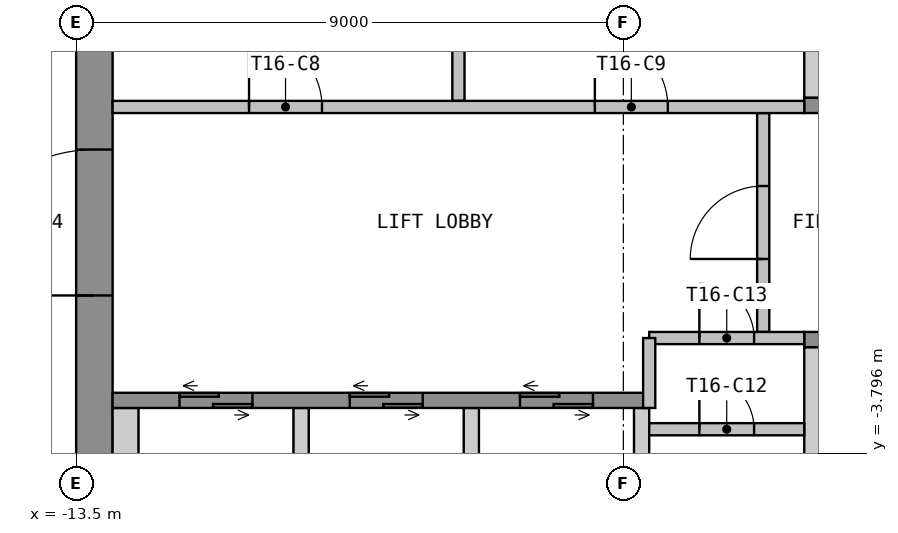
"""IFC4 building model, lengths in metres.
Left out: names, types, materials, properties, quantities, classifications, styles, units other than length and angle.
Written with IfcOpenShell. Run it as: python <this file> out.ifc"""

import sys

from ifc_helpers import new_model, si_unit, direction, frame, frame_2d, origin, place, context, subcontext, project, spatial, polyline, rectangle, outline, extrude, element, fill, save


model = new_model("IFC4")
c1 = context("Model", 3, precision=1e-05, world=origin(), true_north=direction((0.0, 1.0)))
c2 = subcontext(c1, "Body", "Model", "MODEL_VIEW")
j1 = project(units=[si_unit("LENGTHUNIT", "METRE"), si_unit("PLANEANGLEUNIT", "RADIAN")], contexts=[c1])
p1 = place(None, origin())
s1 = spatial("IfcSite", under=j1, at=p1, CompositionType="ELEMENT")
p2 = place(p1, origin())
s2 = spatial("IfcBuilding", under=s1, at=p2, CompositionType="ELEMENT")
p3 = place(p2, frame((0.0, 0.0, 219.0)))
s3 = spatial("IfcBuildingStorey", under=s2, at=p3, CompositionType="ELEMENT", Elevation=219.0)
p4 = place(p3, frame((-13.2, -10.65, 0.0), z_axis=(0.0, 0.0, 1.0), x_axis=(0.0, 1.0, 0.0)))
e1 = element("IfcWall", 1, at=p4, inside=s3, PredefinedType="SHEAR", context=c2, shape_type="SweptSolid", body=[
    extrude(rectangle(XDim=21.3, YDim=0.6, at=frame_2d((10.65, 0.0))), origin(), (0.0, 0.0, 1.0), 3.55),
])
p5 = place(p4, frame((9.45, 0.0, 0.0)))
e2 = element("IfcOpeningElement", 2, at=p5, cuts=e1, PredefinedType="OPENING", context=c2, shape_type="SweptSolid", body=[
    extrude(rectangle(XDim=2.4, YDim=2.1, at=frame_2d((1.2, 1.05))), frame((0.0, 0.31, 0.0), z_axis=(0.0, -1.0, 0.0), x_axis=(1.0, 0.0, 0.0)), (0.0, 0.0, 1.0), 0.62),
])
p6 = place(p3, origin())
e3 = element("IfcWall", 3, at=p6, inside=s3, PredefinedType="SHEAR", context=c2, shape_type="SweptSolid", body=[
    extrude(outline(polyline([(-1.525, 2.05), (-1.275, 2.05), (-1.275, 4.75), (-1.525, 4.75), (-1.525, 2.05)])), origin(), (0.0, 0.0, 1.0), 3.55),
])
p7 = place(p3, frame((-1.525, 1.925, 0.0), z_axis=(0.0, 0.0, 1.0), x_axis=(1.0, 0.0, 0.0)))
e4 = element("IfcWall", 4, at=p7, inside=s3, PredefinedType="SHEAR", context=c2, shape_type="SweptSolid", body=[
    extrude(rectangle(XDim=3.05, YDim=0.25, at=frame_2d((1.525, 0.0))), origin(), (0.0, 0.0, 1.0), 3.55),
])
p8 = place(p7, frame((0.925, 0.0, 0.0)))
e5 = element("IfcOpeningElement", 5, at=p8, cuts=e4, PredefinedType="OPENING", context=c2, shape_type="SweptSolid", body=[
    extrude(rectangle(XDim=1.2, YDim=2.1, at=frame_2d((0.6, 1.05))), frame((0.0, 0.135, 0.0), z_axis=(0.0, -1.0, 0.0), x_axis=(1.0, 0.0, 0.0)), (0.0, 0.0, 1.0), 0.27),
])
p9 = place(p3, origin())
e6 = element("IfcWall", 6, at=p9, inside=s3, PredefinedType="SHEAR", context=c2, shape_type="SweptSolid", body=[
    extrude(outline(polyline([(-12.9, -4.75), (-12.475, -4.75), (-12.475, -3.05), (-12.9, -3.05), (-12.9, -4.75)])), origin(), (0.0, 0.0, 1.0), 3.55),
])
p10 = place(p3, origin())
e7 = element("IfcWall", 7, at=p10, inside=s3, PredefinedType="SHEAR", context=c2, shape_type="SweptSolid", body=[
    extrude(outline(polyline([(-9.925, -4.75), (-9.675, -4.75), (-9.675, -3.05), (-9.925, -3.05), (-9.925, -4.75)])), origin(), (0.0, 0.0, 1.0), 3.55),
])
p11 = place(p3, origin())
e8 = element("IfcWall", 8, at=p11, inside=s3, PredefinedType="SHEAR", context=c2, shape_type="SweptSolid", body=[
    extrude(outline(polyline([(-7.125, -4.75), (-6.875, -4.75), (-6.875, -3.05), (-7.125, -3.05), (-7.125, -4.75)])), origin(), (0.0, 0.0, 1.0), 3.55),
])
p12 = place(p3, origin())
e9 = element("IfcWall", 9, at=p12, inside=s3, PredefinedType="SHEAR", context=c2, shape_type="SweptSolid", body=[
    extrude(outline(polyline([(-4.325, -4.75), (-4.075, -4.75), (-4.075, -3.05), (-4.325, -3.05), (-4.325, -4.75)])), origin(), (0.0, 0.0, 1.0), 3.55),
])
p13 = place(p3, origin())
e10 = element("IfcWall", 10, at=p13, inside=s3, PredefinedType="SHEAR", context=c2, shape_type="SweptSolid", body=[
    extrude(outline(polyline([(-1.525, -4.75), (-1.275, -4.75), (-1.275, -2.05), (-1.525, -2.05), (-1.525, -4.75)])), origin(), (0.0, 0.0, 1.0), 3.55),
])
p14 = place(p3, frame((-12.9, -2.925, 0.0), z_axis=(0.0, 0.0, 1.0), x_axis=(1.0, 0.0, 0.0)))
e11 = element("IfcWall", 11, at=p14, inside=s3, PredefinedType="SHEAR", context=c2, shape_type="SweptSolid", body=[
    extrude(rectangle(XDim=8.825, YDim=0.25, at=frame_2d((4.413, 0.0))), origin(), (0.0, 0.0, 1.0), 3.55),
])
p15 = place(p14, frame((1.1, 0.0, 0.0)))
e12 = element("IfcOpeningElement", 12, at=p15, cuts=e11, PredefinedType="OPENING", context=c2, shape_type="SweptSolid", body=[
    extrude(rectangle(XDim=1.2, YDim=2.1, at=frame_2d((0.6, 1.05))), frame((0.0, 0.135, 0.0), z_axis=(0.0, -1.0, 0.0), x_axis=(1.0, 0.0, 0.0)), (0.0, 0.0, 1.0), 0.27),
])
p16 = place(p14, frame((3.9, 0.0, 0.0)))
e13 = element("IfcOpeningElement", 13, at=p16, cuts=e11, PredefinedType="OPENING", context=c2, shape_type="SweptSolid", body=[
    extrude(rectangle(XDim=1.2, YDim=2.1, at=frame_2d((0.6, 1.05))), frame((0.0, 0.135, 0.0), z_axis=(0.0, -1.0, 0.0), x_axis=(1.0, 0.0, 0.0)), (0.0, 0.0, 1.0), 0.27),
])
p17 = place(p14, frame((6.7, 0.0, 0.0)))
e14 = element("IfcOpeningElement", 14, at=p17, cuts=e11, PredefinedType="OPENING", context=c2, shape_type="SweptSolid", body=[
    extrude(rectangle(XDim=1.2, YDim=2.1, at=frame_2d((0.6, 1.05))), frame((0.0, 0.135, 0.0), z_axis=(0.0, -1.0, 0.0), x_axis=(1.0, 0.0, 0.0)), (0.0, 0.0, 1.0), 0.27),
])
p18 = place(p3, frame((-1.525, -1.925, 0.0), z_axis=(0.0, 0.0, 1.0), x_axis=(1.0, 0.0, 0.0)))
e15 = element("IfcWall", 15, at=p18, inside=s3, PredefinedType="SHEAR", context=c2, shape_type="SweptSolid", body=[
    extrude(rectangle(XDim=14.425, YDim=0.25, at=frame_2d((7.212, 0.0))), origin(), (0.0, 0.0, 1.0), 3.55),
])
p19 = place(p18, frame((0.925, 0.0, 0.0)))
e16 = element("IfcOpeningElement", 16, at=p19, cuts=e15, PredefinedType="OPENING", context=c2, shape_type="SweptSolid", body=[
    extrude(rectangle(XDim=1.2, YDim=2.1, at=frame_2d((0.6, 1.05))), frame((0.0, 0.135, 0.0), z_axis=(0.0, -1.0, 0.0), x_axis=(1.0, 0.0, 0.0)), (0.0, 0.0, 1.0), 0.27),
])
p20 = place(p18, frame((3.725, 0.0, 0.0)))
e17 = element("IfcOpeningElement", 17, at=p20, cuts=e15, PredefinedType="OPENING", context=c2, shape_type="SweptSolid", body=[
    extrude(rectangle(XDim=1.2, YDim=2.1, at=frame_2d((0.6, 1.05))), frame((0.0, 0.135, 0.0), z_axis=(0.0, -1.0, 0.0), x_axis=(1.0, 0.0, 0.0)), (0.0, 0.0, 1.0), 0.27),
])
p21 = place(p3, frame((-2.2, -1.8, 0.0), z_axis=(0.0, 0.0, 1.0), x_axis=(0.0, 1.0, 0.0)))
e18 = element("IfcWall", 18, at=p21, inside=s3, PredefinedType="PARTITIONING", context=c2, shape_type="SweptSolid", body=[
    extrude(rectangle(XDim=3.6, YDim=0.2, at=frame_2d((1.8, 0.0))), origin(), (0.0, 0.0, 1.0), 3.55),
])
p22 = place(p21, frame((1.2, 0.0, 0.0)))
e19 = element("IfcOpeningElement", 19, at=p22, cuts=e18, PredefinedType="OPENING", context=c2, shape_type="SweptSolid", body=[
    extrude(rectangle(XDim=1.2, YDim=2.1, at=frame_2d((0.6, 1.05))), frame((0.0, 0.11, 0.0), z_axis=(0.0, -1.0, 0.0), x_axis=(1.0, 0.0, 0.0)), (0.0, 0.0, 1.0), 0.22),
])
p23 = place(p3, frame((-7.212, 2.0, 0.0), z_axis=(0.0, 0.0, 1.0), x_axis=(0.0, 1.0, 0.0)))
e20 = element("IfcWall", 20, at=p23, inside=s3, PredefinedType="PARTITIONING", context=c2, shape_type="SweptSolid", body=[
    extrude(rectangle(XDim=2.8, YDim=0.2, at=frame_2d((1.4, 0.0))), origin(), (0.0, 0.0, 1.0), 3.55),
])
p24 = place(p3, frame((-12.9, 1.9, 0.0), z_axis=(0.0, 0.0, 1.0), x_axis=(1.0, 0.0, 0.0)))
e21 = element("IfcWall", 21, at=p24, inside=s3, PredefinedType="PARTITIONING", context=c2, shape_type="SweptSolid", body=[
    extrude(rectangle(XDim=11.375, YDim=0.2, at=frame_2d((5.688, 0.0))), origin(), (0.0, 0.0, 1.0), 3.55),
])
p25 = place(p24, frame((2.244, 0.0, 0.0)))
e22 = element("IfcOpeningElement", 22, at=p25, cuts=e21, PredefinedType="OPENING", context=c2, shape_type="SweptSolid", body=[
    extrude(rectangle(XDim=1.2, YDim=2.1, at=frame_2d((0.6, 1.05))), frame((0.0, 0.11, 0.0), z_axis=(0.0, -1.0, 0.0), x_axis=(1.0, 0.0, 0.0)), (0.0, 0.0, 1.0), 0.22),
])
p26 = place(p24, frame((7.931, 0.0, 0.0)))
e23 = element("IfcOpeningElement", 23, at=p26, cuts=e21, PredefinedType="OPENING", context=c2, shape_type="SweptSolid", body=[
    extrude(rectangle(XDim=1.2, YDim=2.1, at=frame_2d((0.6, 1.05))), frame((0.0, 0.11, 0.0), z_axis=(0.0, -1.0, 0.0), x_axis=(1.0, 0.0, 0.0)), (0.0, 0.0, 1.0), 0.22),
])
p27 = place(p3, frame((-4.075, -3.4, 0.0), z_axis=(0.0, 0.0, 1.0), x_axis=(1.0, 0.0, 0.0)))
e24 = element("IfcWall", 24, at=p27, inside=s3, PredefinedType="PARTITIONING", context=c2, shape_type="SweptSolid", body=[
    extrude(rectangle(XDim=2.55, YDim=0.2, at=frame_2d((1.275, 0.0))), origin(), (0.0, 0.0, 1.0), 3.55),
])
p28 = place(p27, frame((0.825, 0.0, 0.0)))
e25 = element("IfcOpeningElement", 25, at=p28, cuts=e24, PredefinedType="OPENING", context=c2, shape_type="SweptSolid", body=[
    extrude(rectangle(XDim=0.9, YDim=2.1, at=frame_2d((0.45, 1.05))), frame((0.0, 0.11, 0.0), z_axis=(0.0, -1.0, 0.0), x_axis=(1.0, 0.0, 0.0)), (0.0, 0.0, 1.0), 0.22),
])
p29 = place(p3, frame((-4.075, -1.9, 0.0), z_axis=(0.0, 0.0, 1.0), x_axis=(1.0, 0.0, 0.0)))
e26 = element("IfcWall", 26, at=p29, inside=s3, PredefinedType="PARTITIONING", context=c2, shape_type="SweptSolid", body=[
    extrude(rectangle(XDim=2.55, YDim=0.2, at=frame_2d((1.275, 0.0))), origin(), (0.0, 0.0, 1.0), 3.55),
])
p30 = place(p29, frame((0.825, 0.0, 0.0)))
e27 = element("IfcOpeningElement", 27, at=p30, cuts=e26, PredefinedType="OPENING", context=c2, shape_type="SweptSolid", body=[
    extrude(rectangle(XDim=0.9, YDim=2.1, at=frame_2d((0.45, 1.05))), frame((0.0, 0.11, 0.0), z_axis=(0.0, -1.0, 0.0), x_axis=(1.0, 0.0, 0.0)), (0.0, 0.0, 1.0), 0.22),
])
p31 = place(p3, frame((-4.075, -1.9, 0.0), z_axis=(0.0, 0.0, 1.0), x_axis=(0.0, -1.0, 0.0)))
e28 = element("IfcWall", 28, at=p31, inside=s3, PredefinedType="PARTITIONING", context=c2, shape_type="SweptSolid", body=[
    extrude(rectangle(XDim=1.15, YDim=0.2, at=frame_2d((0.575, 0.0))), origin(), (0.0, 0.0, 1.0), 3.55),
])
p32 = place(p5, origin())
e29 = element("IfcDoor", 29, at=p32, inside=s3, OperationType="DOUBLE_DOOR_DOUBLE_SWING", PredefinedType="DOOR", context=c2, shape_type="SweptSolid", body=[
    extrude(rectangle(XDim=2.4, YDim=2.1, at=frame_2d((1.2, 1.05))), frame((0.0, 0.025, 0.0), z_axis=(0.0, -1.0, 0.0), x_axis=(1.0, 0.0, 0.0)), (0.0, 0.0, 1.0), 0.05),
])
fill(e2, e29)
p33 = place(p15, origin())
e30 = element("IfcDoor", 30, at=p33, inside=s3, OperationType="DOUBLE_DOOR_SLIDING", PredefinedType="DOOR", context=c2, shape_type="SweptSolid", body=[
    extrude(rectangle(XDim=1.2, YDim=2.1, at=frame_2d((0.6, 1.05))), frame((0.0, 0.025, 0.0), z_axis=(0.0, -1.0, 0.0), x_axis=(1.0, 0.0, 0.0)), (0.0, 0.0, 1.0), 0.05),
])
fill(e12, e30)
p34 = place(p16, origin())
e31 = element("IfcDoor", 31, at=p34, inside=s3, OperationType="DOUBLE_DOOR_SLIDING", PredefinedType="DOOR", context=c2, shape_type="SweptSolid", body=[
    extrude(rectangle(XDim=1.2, YDim=2.1, at=frame_2d((0.6, 1.05))), frame((0.0, 0.025, 0.0), z_axis=(0.0, -1.0, 0.0), x_axis=(1.0, 0.0, 0.0)), (0.0, 0.0, 1.0), 0.05),
])
fill(e13, e31)
p35 = place(p17, origin())
e32 = element("IfcDoor", 32, at=p35, inside=s3, OperationType="DOUBLE_DOOR_SLIDING", PredefinedType="DOOR", context=c2, shape_type="SweptSolid", body=[
    extrude(rectangle(XDim=1.2, YDim=2.1, at=frame_2d((0.6, 1.05))), frame((0.0, 0.025, 0.0), z_axis=(0.0, -1.0, 0.0), x_axis=(1.0, 0.0, 0.0)), (0.0, 0.0, 1.0), 0.05),
])
fill(e14, e32)
p36 = place(p22, origin())
e33 = element("IfcDoor", 33, at=p36, inside=s3, OperationType="SINGLE_SWING_LEFT", PredefinedType="DOOR", context=c2, shape_type="SweptSolid", body=[
    extrude(rectangle(XDim=1.2, YDim=2.1, at=frame_2d((0.6, 1.05))), frame((0.0, 0.025, 0.0), z_axis=(0.0, -1.0, 0.0), x_axis=(1.0, 0.0, 0.0)), (0.0, 0.0, 1.0), 0.05),
])
fill(e19, e33)
p37 = place(p25, origin())
e34 = element("IfcDoor", 34, at=p37, inside=s3, OperationType="SINGLE_SWING_RIGHT", PredefinedType="DOOR", context=c2, shape_type="SweptSolid", body=[
    extrude(rectangle(XDim=1.2, YDim=2.1, at=frame_2d((0.6, 1.05))), frame((0.0, 0.025, 0.0), z_axis=(0.0, -1.0, 0.0), x_axis=(1.0, 0.0, 0.0)), (0.0, 0.0, 1.0), 0.05),
])
fill(e22, e34)
p38 = place(p26, origin())
e35 = element("IfcDoor", 35, at=p38, inside=s3, OperationType="SINGLE_SWING_RIGHT", PredefinedType="DOOR", context=c2, shape_type="SweptSolid", body=[
    extrude(rectangle(XDim=1.2, YDim=2.1, at=frame_2d((0.6, 1.05))), frame((0.0, 0.025, 0.0), z_axis=(0.0, -1.0, 0.0), x_axis=(1.0, 0.0, 0.0)), (0.0, 0.0, 1.0), 0.05),
])
fill(e23, e35)
p39 = place(p28, origin())
e36 = element("IfcDoor", 36, at=p39, inside=s3, OperationType="SINGLE_SWING_LEFT", PredefinedType="DOOR", context=c2, shape_type="SweptSolid", body=[
    extrude(rectangle(XDim=0.9, YDim=2.1, at=frame_2d((0.45, 1.05))), frame((0.0, 0.025, 0.0), z_axis=(0.0, -1.0, 0.0), x_axis=(1.0, 0.0, 0.0)), (0.0, 0.0, 1.0), 0.05),
])
fill(e25, e36)
p40 = place(p30, origin())
e37 = element("IfcDoor", 37, at=p40, inside=s3, OperationType="SINGLE_SWING_LEFT", PredefinedType="DOOR", context=c2, shape_type="SweptSolid", body=[
    extrude(rectangle(XDim=0.9, YDim=2.1, at=frame_2d((0.45, 1.05))), frame((0.0, 0.025, 0.0), z_axis=(0.0, -1.0, 0.0), x_axis=(1.0, 0.0, 0.0)), (0.0, 0.0, 1.0), 0.05),
])
fill(e27, e37)
save(model, sys.argv[1])
